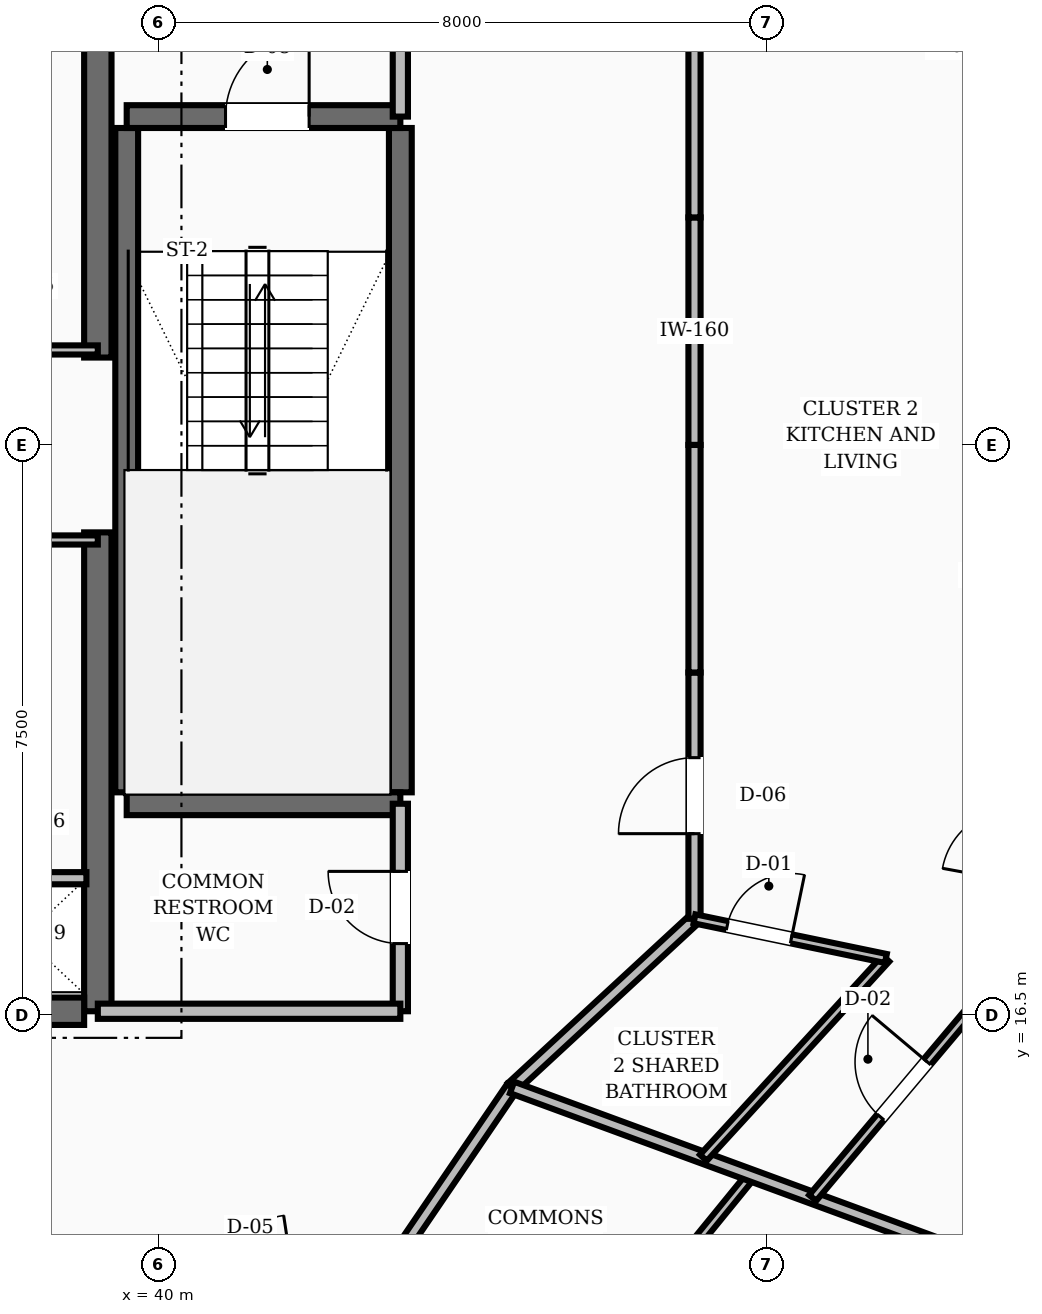
"""IFC4 building model, lengths in metres.
Left out: names, types, materials, properties, quantities, classifications, styles, units other than length and angle.
Written with IfcOpenShell. Run it as: python <this file> out.ifc"""

import sys

from ifc_helpers import new_model, si_unit, direction, frame, frame_2d, origin, place, context, subcontext, project, spatial, rectangle, extrude, element, fill, save


model = new_model("IFC4")
c1 = context("Model", 3, precision=1e-05, world=origin(), true_north=direction((0.0, 1.0)))
c2 = subcontext(c1, "Body", "Model", "MODEL_VIEW")
j1 = project(units=[si_unit("LENGTHUNIT", "METRE"), si_unit("PLANEANGLEUNIT", "RADIAN")], contexts=[c1])
p1 = place(None, origin())
s1 = spatial("IfcSite", under=j1, at=p1, CompositionType="ELEMENT")
p2 = place(p1, origin())
s2 = spatial("IfcBuilding", under=s1, at=p2, CompositionType="ELEMENT")
p3 = place(p2, frame((0.0, 0.0, 131.6)))
s3 = spatial("IfcBuildingStorey", under=s2, at=p3, CompositionType="ELEMENT", Elevation=131.6)
for number, where, z_axis, x_axis in (
    (1, (39.2, 16.55, 0.0), (0.0, 0.0, 1.0), (0.0, 1.0, 0.0)),
    (2, (39.2, 25.15, 0.0), (0.0, 0.0, 1.0), (0.0, 1.0, 0.0)),
):
    element("IfcWall", number, at=place(p3, frame(where, z_axis=z_axis, x_axis=x_axis)), inside=s3, PredefinedType="SHEAR", context=c2, shape_type="SweptSolid", body=[
        extrude(rectangle(XDim=6.3, YDim=0.36, at=frame_2d((3.15, 0.0))), origin(), (0.0, 0.0, 1.0), 3.6),
    ])
p4 = place(p3, frame((35.8, 16.55, 0.0), z_axis=(0.0, 0.0, 1.0), x_axis=(1.0, 0.0, 0.0)))
e3 = element("IfcWall", 3, at=p4, inside=s3, PredefinedType="SHEAR", context=c2, shape_type="SweptSolid", body=[
    extrude(rectangle(XDim=3.22, YDim=0.36, at=frame_2d((1.61, 0.0))), origin(), (0.0, 0.0, 1.0), 3.6),
])
p5 = place(p4, frame((0.3, 0.0, 0.0)))
e4 = element("IfcOpeningElement", 4, at=p5, cuts=e3, PredefinedType="OPENING", context=c2, shape_type="SweptSolid", body=[
    extrude(rectangle(XDim=1.1, YDim=2.1, at=frame_2d((0.55, 1.05))), frame((0.0, 0.19, 0.0), z_axis=(0.0, -1.0, 0.0), x_axis=(1.0, 0.0, 0.0)), (0.0, 0.0, 1.0), 0.38),
])
for number, where, z_axis, x_axis in (
    (5, (43.18, 19.43, 0.0), (0.0, 0.0, 1.0), (0.0, 1.0, 0.0)),
    (6, (39.58, 19.43, 0.0), (0.0, 0.0, 1.0), (0.0, 1.0, 0.0)),
):
    element("IfcWall", number, at=place(p3, frame(where, z_axis=z_axis, x_axis=x_axis)), inside=s3, PredefinedType="SHEAR", context=c2, shape_type="SweptSolid", body=[
        extrude(rectangle(XDim=8.74, YDim=0.3, at=frame_2d((4.37, 0.0))), origin(), (0.0, 0.0, 1.0), 3.6),
    ])
p6 = place(p3, frame((39.58, 19.28, 0.0), z_axis=(0.0, 0.0, 1.0), x_axis=(1.0, 0.0, 0.0)))
e7 = element("IfcWall", 7, at=p6, inside=s3, PredefinedType="SHEAR", context=c2, shape_type="SweptSolid", body=[
    extrude(rectangle(XDim=3.6, YDim=0.3, at=frame_2d((1.8, 0.0))), origin(), (0.0, 0.0, 1.0), 3.6),
])
p7 = place(p3, frame((39.58, 28.32, 0.0), z_axis=(0.0, 0.0, 1.0), x_axis=(1.0, 0.0, 0.0)))
e8 = element("IfcWall", 8, at=p7, inside=s3, PredefinedType="SHEAR", context=c2, shape_type="SweptSolid", body=[
    extrude(rectangle(XDim=3.6, YDim=0.3, at=frame_2d((1.8, 0.0))), origin(), (0.0, 0.0, 1.0), 3.6),
])
p8 = place(p7, frame((1.3, 0.0, 0.0)))
e9 = element("IfcOpeningElement", 9, at=p8, cuts=e8, PredefinedType="OPENING", context=c2, shape_type="SweptSolid", body=[
    extrude(rectangle(XDim=1.1, YDim=2.1, at=frame_2d((0.55, 1.05))), frame((0.0, 0.16, 0.0), z_axis=(0.0, -1.0, 0.0), x_axis=(1.0, 0.0, 0.0)), (0.0, 0.0, 1.0), 0.32),
])
p9 = place(p3, frame((43.18, 28.32, 0.0), z_axis=(0.0, 0.0, 1.0), x_axis=(0.0, 1.0, 0.0)))
e10 = element("IfcWall", 10, at=p9, inside=s3, PredefinedType="SOLIDWALL", context=c2, shape_type="SweptSolid", body=[
    extrude(rectangle(XDim=3.13, YDim=0.2, at=frame_2d((1.565, 0.0))), origin(), (0.0, 0.0, 1.0), 2.8),
])
p10 = place(p9, frame((1.015, 0.0, 0.0)))
e11 = element("IfcOpeningElement", 11, at=p10, cuts=e10, PredefinedType="OPENING", context=c2, shape_type="SweptSolid", body=[
    extrude(rectangle(XDim=1.1, YDim=2.1, at=frame_2d((0.55, 1.05))), frame((0.0, 0.11, 0.0), z_axis=(0.0, -1.0, 0.0), x_axis=(1.0, 0.0, 0.0)), (0.0, 0.0, 1.0), 0.22),
])
p11 = place(p3, frame((43.18, 16.55, 0.0), z_axis=(0.0, 0.0, 1.0), x_axis=(0.0, 1.0, 0.0)))
e12 = element("IfcWall", 12, at=p11, inside=s3, PredefinedType="SOLIDWALL", context=c2, shape_type="SweptSolid", body=[
    extrude(rectangle(XDim=2.73, YDim=0.2, at=frame_2d((1.365, 0.0))), origin(), (0.0, 0.0, 1.0), 2.8),
])
p12 = place(p11, frame((0.89, 0.0, 0.0)))
e13 = element("IfcOpeningElement", 13, at=p12, cuts=e12, PredefinedType="OPENING", context=c2, shape_type="SweptSolid", body=[
    extrude(rectangle(XDim=0.95, YDim=2.1, at=frame_2d((0.475, 1.05))), frame((0.0, 0.11, 0.0), z_axis=(0.0, -1.0, 0.0), x_axis=(1.0, 0.0, 0.0)), (0.0, 0.0, 1.0), 0.22),
])
p13 = place(p3, frame((39.2, 16.55, 0.0), z_axis=(0.0, 0.0, 1.0), x_axis=(1.0, 0.0, 0.0)))
e14 = element("IfcWall", 14, at=p13, inside=s3, PredefinedType="SOLIDWALL", context=c2, shape_type="SweptSolid", body=[
    extrude(rectangle(XDim=3.98, YDim=0.2, at=frame_2d((1.99, 0.0))), origin(), (0.0, 0.0, 1.0), 2.8),
])
p14 = place(p3, frame((37.4, 18.3, 0.0), z_axis=(0.0, 0.0, 1.0), x_axis=(1.0, 0.0, 0.0)))
e15 = element("IfcWall", 15, at=p14, inside=s3, PredefinedType="SOLIDWALL", context=c2, shape_type="SweptSolid", body=[
    extrude(rectangle(XDim=1.65, YDim=0.16, at=frame_2d((0.825, 0.0))), origin(), (0.0, 0.0, 1.0), 2.8),
])
for number, where, z_axis, x_axis in (
    (16, (37.4, 25.25, 0.0), (0.0, 0.0, 1.0), (1.0, 0.0, 0.0)),
    (17, (37.4, 22.75, 0.0), (0.0, 0.0, 1.0), (1.0, 0.0, 0.0)),
):
    element("IfcWall", number, at=place(p3, frame(where, z_axis=z_axis, x_axis=x_axis)), inside=s3, PredefinedType="PARTITIONING", context=c2, shape_type="SweptSolid", body=[
        extrude(rectangle(XDim=1.8, YDim=0.12, at=frame_2d((0.9, 0.0))), origin(), (0.0, 0.0, 1.0), 2.8),
    ])
p15 = place(p3, frame((47.05, 24.0, 0.0), z_axis=(0.0, 0.0, 1.0), x_axis=(0.0, 1.0, 0.0)))
e18 = element("IfcWall", 18, at=p15, inside=s3, PredefinedType="SOLIDWALL", context=c2, shape_type="SweptSolid", body=[
    extrude(rectangle(XDim=2.994, YDim=0.16, at=frame_2d((1.497, 0.0))), origin(), (0.0, 0.0, 1.0), 2.8),
])
p16 = place(p3, frame((47.05, 26.994, 0.0), z_axis=(0.0, 0.0, 1.0), x_axis=(0.0, 1.0, 0.0)))
e19 = element("IfcWall", 19, at=p16, inside=s3, PredefinedType="SOLIDWALL", context=c2, shape_type="SweptSolid", body=[
    extrude(rectangle(XDim=3.24, YDim=0.16, at=frame_2d((1.62, 0.0))), origin(), (0.0, 0.0, 1.0), 2.8),
])
p17 = place(p3, frame((42.95, 13.05, 0.0), z_axis=(0.0, 0.0, 1.0), x_axis=(0.562674669208, 0.826678423955, 0.0)))
e20 = element("IfcWall", 20, at=p17, inside=s3, PredefinedType="SOLIDWALL", context=c2, shape_type="SweptSolid", body=[
    extrude(rectangle(XDim=3.021, YDim=0.16, at=frame_2d((1.511, 0.0))), origin(), (0.0, 0.0, 1.0), 2.8),
])
p18 = place(p3, frame((44.65, 15.548, 0.0), z_axis=(0.0, 0.0, 1.0), x_axis=(0.734347936521, 0.678773237633, 0.0)))
e21 = element("IfcWall", 21, at=p18, inside=s3, PredefinedType="SOLIDWALL", context=c2, shape_type="SweptSolid", body=[
    extrude(rectangle(XDim=3.268, YDim=0.16, at=frame_2d((1.634, 0.0))), origin(), (0.0, 0.0, 1.0), 2.8),
])
p19 = place(p3, frame((47.05, 17.766, 0.0), z_axis=(0.0, 0.0, 1.0), x_axis=(0.0, 1.0, 0.0)))
e22 = element("IfcWall", 22, at=p19, inside=s3, PredefinedType="SOLIDWALL", context=c2, shape_type="SweptSolid", body=[
    extrude(rectangle(XDim=3.24, YDim=0.16, at=frame_2d((1.62, 0.0))), origin(), (0.0, 0.0, 1.0), 2.8),
])
p20 = place(p19, frame((1.12, 0.0, 0.0)))
e23 = element("IfcOpeningElement", 23, at=p20, cuts=e22, PredefinedType="OPENING", context=c2, shape_type="SweptSolid", body=[
    extrude(rectangle(XDim=1.0, YDim=2.1, at=frame_2d((0.5, 1.05))), frame((0.0, 0.09, 0.0), z_axis=(0.0, -1.0, 0.0), x_axis=(1.0, 0.0, 0.0)), (0.0, 0.0, 1.0), 0.18),
])
p21 = place(p3, frame((47.05, 21.006, 0.0), z_axis=(0.0, 0.0, 1.0), x_axis=(0.0, 1.0, 0.0)))
e24 = element("IfcWall", 24, at=p21, inside=s3, PredefinedType="SOLIDWALL", context=c2, shape_type="SweptSolid", body=[
    extrude(rectangle(XDim=2.994, YDim=0.16, at=frame_2d((1.497, 0.0))), origin(), (0.0, 0.0, 1.0), 2.8),
])
p22 = place(p3, frame((45.558, 11.646, 0.0), z_axis=(0.0, 0.0, 1.0), x_axis=(0.631780340891, 0.775147470397, 0.0)))
e25 = element("IfcWall", 25, at=p22, inside=s3, PredefinedType="PARTITIONING", context=c2, shape_type="SweptSolid", body=[
    extrude(rectangle(XDim=3.542, YDim=0.12, at=frame_2d((1.771, 0.0))), origin(), (0.0, 0.0, 1.0), 2.8),
])
p23 = place(p3, frame((44.65, 15.548, 0.0), z_axis=(0.0, 0.0, 1.0), x_axis=(0.938597960156, -0.345012853661, 0.0)))
e26 = element("IfcWall", 26, at=p23, inside=s3, PredefinedType="SOLIDWALL", context=c2, shape_type="SweptSolid", body=[
    extrude(rectangle(XDim=9.526, YDim=0.16, at=frame_2d((4.763, 0.0))), origin(), (0.0, 0.0, 1.0), 2.8),
])
p24 = place(p3, frame((47.167, 14.623, 0.0), z_axis=(0.0, 0.0, 1.0), x_axis=(0.675494490503, 0.737365033956, 0.0)))
e27 = element("IfcWall", 27, at=p24, inside=s3, PredefinedType="PARTITIONING", context=c2, shape_type="SweptSolid", body=[
    extrude(rectangle(XDim=3.555, YDim=0.12, at=frame_2d((1.778, 0.0))), origin(), (0.0, 0.0, 1.0), 2.8),
])
p25 = place(p3, frame((47.05, 17.766, 0.0), z_axis=(0.0, 0.0, 1.0), x_axis=(0.979183706755, -0.202976029188, 0.0)))
e28 = element("IfcWall", 28, at=p25, inside=s3, PredefinedType="PARTITIONING", context=c2, shape_type="SweptSolid", body=[
    extrude(rectangle(XDim=2.572, YDim=0.12, at=frame_2d((1.286, 0.0))), origin(), (0.0, 0.0, 1.0), 2.8),
])
p26 = place(p25, frame((0.44, 0.0, 0.0)))
e29 = element("IfcOpeningElement", 29, at=p26, cuts=e28, PredefinedType="OPENING", context=c2, shape_type="SweptSolid", body=[
    extrude(rectangle(XDim=0.86, YDim=2.1, at=frame_2d((0.43, 1.05))), frame((0.0, 0.07, 0.0), z_axis=(0.0, -1.0, 0.0), x_axis=(1.0, 0.0, 0.0)), (0.0, 0.0, 1.0), 0.14),
])
p27 = place(p3, frame((48.605, 14.094, 0.0), z_axis=(0.0, 0.0, 1.0), x_axis=(0.644194213793, 0.764861958078, 0.0)))
e30 = element("IfcWall", 30, at=p27, inside=s3, PredefinedType="PARTITIONING", context=c2, shape_type="SweptSolid", body=[
    extrude(rectangle(XDim=3.729, YDim=0.12, at=frame_2d((1.864, 0.0))), origin(), (0.0, 0.0, 1.0), 2.8),
])
p28 = place(p27, frame((1.389, 0.0, 0.0)))
e31 = element("IfcOpeningElement", 31, at=p28, cuts=e30, PredefinedType="OPENING", context=c2, shape_type="SweptSolid", body=[
    extrude(rectangle(XDim=0.95, YDim=2.1, at=frame_2d((0.475, 1.05))), frame((0.0, 0.07, 0.0), z_axis=(0.0, -1.0, 0.0), x_axis=(1.0, 0.0, 0.0)), (0.0, 0.0, 1.0), 0.14),
])
p29 = place(p8, origin())
e32 = element("IfcDoor", 32, at=p29, inside=s3, OperationType="SINGLE_SWING_RIGHT", PredefinedType="DOOR", context=c2, shape_type="SweptSolid", body=[
    extrude(rectangle(XDim=1.1, YDim=2.1, at=frame_2d((0.55, 1.05))), frame((0.0, 0.025, 0.0), z_axis=(0.0, -1.0, 0.0), x_axis=(1.0, 0.0, 0.0)), (0.0, 0.0, 1.0), 0.05),
])
fill(e9, e32)
p30 = place(p12, origin())
e33 = element("IfcDoor", 33, at=p30, inside=s3, OperationType="SINGLE_SWING_RIGHT", PredefinedType="DOOR", context=c2, shape_type="SweptSolid", body=[
    extrude(rectangle(XDim=0.95, YDim=2.1, at=frame_2d((0.475, 1.05))), frame((0.0, 0.025, 0.0), z_axis=(0.0, -1.0, 0.0), x_axis=(1.0, 0.0, 0.0)), (0.0, 0.0, 1.0), 0.05),
])
fill(e13, e33)
p31 = place(p26, origin())
e34 = element("IfcDoor", 34, at=p31, inside=s3, OperationType="SINGLE_SWING_RIGHT", PredefinedType="DOOR", context=c2, shape_type="SweptSolid", body=[
    extrude(rectangle(XDim=0.86, YDim=2.1, at=frame_2d((0.43, 1.05))), frame((0.0, 0.025, 0.0), z_axis=(0.0, -1.0, 0.0), x_axis=(1.0, 0.0, 0.0)), (0.0, 0.0, 1.0), 0.05),
])
fill(e29, e34)
p32 = place(p20, origin())
e35 = element("IfcDoor", 35, at=p32, inside=s3, OperationType="SINGLE_SWING_LEFT", PredefinedType="DOOR", context=c2, shape_type="SweptSolid", body=[
    extrude(rectangle(XDim=1.0, YDim=2.1, at=frame_2d((0.5, 1.05))), frame((0.0, 0.025, 0.0), z_axis=(0.0, -1.0, 0.0), x_axis=(1.0, 0.0, 0.0)), (0.0, 0.0, 1.0), 0.05),
])
fill(e23, e35)
p33 = place(p28, origin())
e36 = element("IfcDoor", 36, at=p33, inside=s3, OperationType="SINGLE_SWING_RIGHT", PredefinedType="DOOR", context=c2, shape_type="SweptSolid", body=[
    extrude(rectangle(XDim=0.95, YDim=2.1, at=frame_2d((0.475, 1.05))), frame((0.0, 0.025, 0.0), z_axis=(0.0, -1.0, 0.0), x_axis=(1.0, 0.0, 0.0)), (0.0, 0.0, 1.0), 0.05),
])
fill(e31, e36)
save(model, sys.argv[1])
